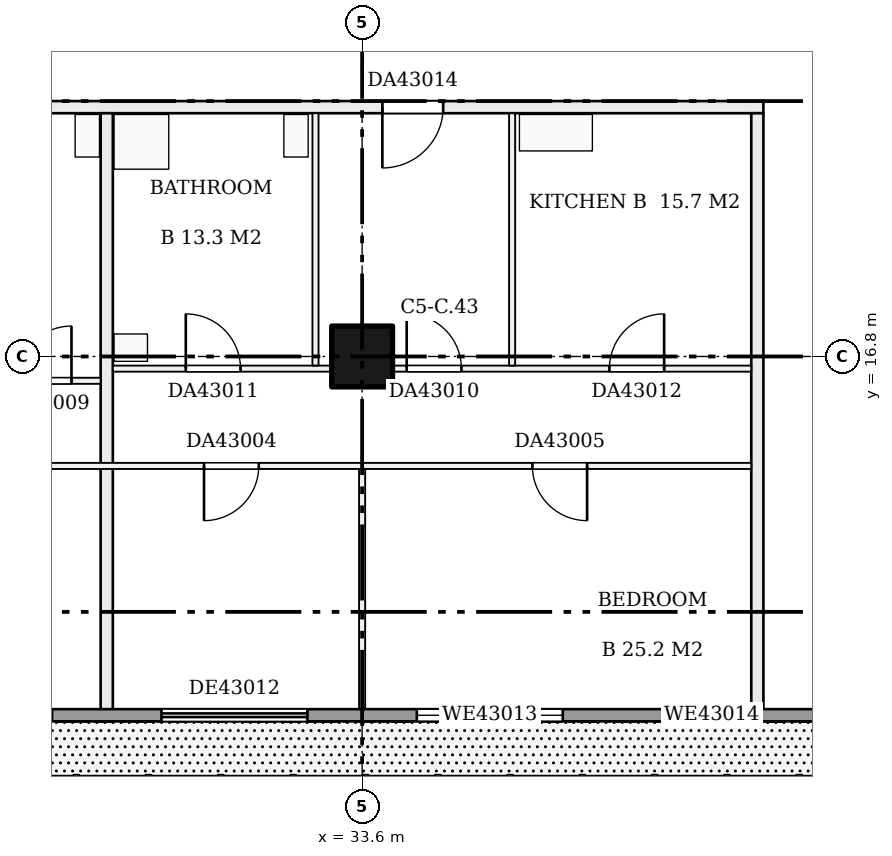
"""IFC4 building model, lengths in metres.
Left out: names, types, materials, properties, quantities, classifications, styles, units other than length and angle.
Written with IfcOpenShell. Run it as: python <this file> out.ifc"""

import sys

from ifc_helpers import new_model, si_unit, direction, frame, frame_2d, origin, origin_2d, place, context, subcontext, project, spatial, rectangle, extrude, element, fill, save


model = new_model("IFC4")
c1 = context("Model", 3, precision=1e-05, world=origin(), true_north=direction((0.0, 1.0)))
c2 = subcontext(c1, "Body", "Model", "MODEL_VIEW")
j1 = project(units=[si_unit("LENGTHUNIT", "METRE"), si_unit("PLANEANGLEUNIT", "RADIAN")], contexts=[c1])
p1 = place(None, origin())
s1 = spatial("IfcSite", under=j1, at=p1, CompositionType="ELEMENT")
p2 = place(p1, origin())
s2 = spatial("IfcBuilding", under=s1, at=p2, CompositionType="ELEMENT")
p3 = place(p2, frame((0.0, 0.0, 168.7)))
s3 = spatial("IfcBuildingStorey", under=s2, at=p3, CompositionType="ELEMENT", Elevation=168.7)
p4 = place(p3, frame((33.6, 16.8, 0.0), z_axis=(0.0, 0.0, 1.0), x_axis=(1.0, 0.0, 0.0)))
e1 = element("IfcColumn", 1, at=p4, inside=s3, PredefinedType="COLUMN", context=c2, shape_type="SweptSolid", body=[
    extrude(rectangle(XDim=1.0, YDim=1.0, at=origin_2d()), origin(), (0.0, 0.0, 1.0), 3.22),
])
p5 = place(p3, frame((21.1, 15.0, 0.0), z_axis=(0.0, 0.0, 1.0), x_axis=(1.0, 0.0, 0.0)))
e2 = element("IfcWall", 2, at=p5, inside=s3, PredefinedType="PARTITIONING", context=c2, shape_type="SweptSolid", body=[
    extrude(rectangle(XDim=18.9, YDim=0.1, at=frame_2d((9.45, 0.0))), origin(), (0.0, 0.0, 1.0), 3.22),
])
p6 = place(p5, frame((1.6, 0.0, 0.0)))
e3 = element("IfcOpeningElement", 3, at=p6, cuts=e2, PredefinedType="OPENING", context=c2, shape_type="SweptSolid", body=[
    extrude(rectangle(XDim=0.9, YDim=2.1, at=frame_2d((0.45, 1.05))), frame((0.0, 0.06, 0.0), z_axis=(0.0, -1.0, 0.0), x_axis=(1.0, 0.0, 0.0)), (0.0, 0.0, 1.0), 0.12),
])
p7 = place(p5, frame((5.7, 0.0, 0.0)))
e4 = element("IfcOpeningElement", 4, at=p7, cuts=e2, PredefinedType="OPENING", context=c2, shape_type="SweptSolid", body=[
    extrude(rectangle(XDim=0.9, YDim=2.1, at=frame_2d((0.45, 1.05))), frame((0.0, 0.06, 0.0), z_axis=(0.0, -1.0, 0.0), x_axis=(1.0, 0.0, 0.0)), (0.0, 0.0, 1.0), 0.12),
])
p8 = place(p5, frame((9.9, 0.0, 0.0)))
e5 = element("IfcOpeningElement", 5, at=p8, cuts=e2, PredefinedType="OPENING", context=c2, shape_type="SweptSolid", body=[
    extrude(rectangle(XDim=0.9, YDim=2.1, at=frame_2d((0.45, 1.05))), frame((0.0, 0.06, 0.0), z_axis=(0.0, -1.0, 0.0), x_axis=(1.0, 0.0, 0.0)), (0.0, 0.0, 1.0), 0.12),
])
p9 = place(p5, frame((15.3, 0.0, 0.0)))
e6 = element("IfcOpeningElement", 6, at=p9, cuts=e2, PredefinedType="OPENING", context=c2, shape_type="SweptSolid", body=[
    extrude(rectangle(XDim=0.9, YDim=2.1, at=frame_2d((0.45, 1.05))), frame((0.0, 0.06, 0.0), z_axis=(0.0, -1.0, 0.0), x_axis=(1.0, 0.0, 0.0)), (0.0, 0.0, 1.0), 0.12),
])
p10 = place(p3, frame((21.1, 16.4, 0.0), z_axis=(0.0, 0.0, 1.0), x_axis=(1.0, 0.0, 0.0)))
e7 = element("IfcWall", 7, at=p10, inside=s3, PredefinedType="PARTITIONING", context=c2, shape_type="SweptSolid", body=[
    extrude(rectangle(XDim=8.2, YDim=0.1, at=frame_2d((4.1, 0.0))), origin(), (0.0, 0.0, 1.0), 3.22),
])
p11 = place(p10, frame((4.9, 0.0, 0.0)))
e8 = element("IfcOpeningElement", 8, at=p11, cuts=e7, PredefinedType="OPENING", context=c2, shape_type="SweptSolid", body=[
    extrude(rectangle(XDim=0.9, YDim=2.1, at=frame_2d((0.45, 1.05))), frame((0.0, 0.06, 0.0), z_axis=(0.0, -1.0, 0.0), x_axis=(1.0, 0.0, 0.0)), (0.0, 0.0, 1.0), 0.12),
])
p12 = place(p10, frame((0.5, 0.0, 0.0)))
e9 = element("IfcOpeningElement", 9, at=p12, cuts=e7, PredefinedType="OPENING", context=c2, shape_type="SweptSolid", body=[
    extrude(rectangle(XDim=0.9, YDim=2.1, at=frame_2d((0.45, 1.05))), frame((0.0, 0.06, 0.0), z_axis=(0.0, -1.0, 0.0), x_axis=(1.0, 0.0, 0.0)), (0.0, 0.0, 1.0), 0.12),
])
p13 = place(p10, frame((2.48, 0.0, 0.0)))
e10 = element("IfcOpeningElement", 10, at=p13, cuts=e7, PredefinedType="OPENING", context=c2, shape_type="SweptSolid", body=[
    extrude(rectangle(XDim=0.9, YDim=2.1, at=frame_2d((0.45, 1.05))), frame((0.0, 0.06, 0.0), z_axis=(0.0, -1.0, 0.0), x_axis=(1.0, 0.0, 0.0)), (0.0, 0.0, 1.0), 0.12),
])
p14 = place(p10, frame((6.82, 0.0, 0.0)))
e11 = element("IfcOpeningElement", 11, at=p14, cuts=e7, PredefinedType="OPENING", context=c2, shape_type="SweptSolid", body=[
    extrude(rectangle(XDim=0.9, YDim=2.1, at=frame_2d((0.45, 1.05))), frame((0.0, 0.06, 0.0), z_axis=(0.0, -1.0, 0.0), x_axis=(1.0, 0.0, 0.0)), (0.0, 0.0, 1.0), 0.12),
])
p15 = place(p3, frame((29.5, 16.6, 0.0), z_axis=(0.0, 0.0, 1.0), x_axis=(1.0, 0.0, 0.0)))
e12 = element("IfcWall", 12, at=p15, inside=s3, PredefinedType="PARTITIONING", context=c2, shape_type="SweptSolid", body=[
    extrude(rectangle(XDim=10.5, YDim=0.1, at=frame_2d((5.25, 0.0))), origin(), (0.0, 0.0, 1.0), 3.22),
])
p16 = place(p15, frame((4.833, 0.0, 0.0)))
e13 = element("IfcOpeningElement", 13, at=p16, cuts=e12, PredefinedType="OPENING", context=c2, shape_type="SweptSolid", body=[
    extrude(rectangle(XDim=0.9, YDim=2.1, at=frame_2d((0.45, 1.05))), frame((0.0, 0.06, 0.0), z_axis=(0.0, -1.0, 0.0), x_axis=(1.0, 0.0, 0.0)), (0.0, 0.0, 1.0), 0.12),
])
p17 = place(p15, frame((1.2, 0.0, 0.0)))
e14 = element("IfcOpeningElement", 14, at=p17, cuts=e12, PredefinedType="OPENING", context=c2, shape_type="SweptSolid", body=[
    extrude(rectangle(XDim=0.9, YDim=2.1, at=frame_2d((0.45, 1.05))), frame((0.0, 0.06, 0.0), z_axis=(0.0, -1.0, 0.0), x_axis=(1.0, 0.0, 0.0)), (0.0, 0.0, 1.0), 0.12),
])
p18 = place(p15, frame((8.167, 0.0, 0.0)))
e15 = element("IfcOpeningElement", 15, at=p18, cuts=e12, PredefinedType="OPENING", context=c2, shape_type="SweptSolid", body=[
    extrude(rectangle(XDim=0.9, YDim=2.1, at=frame_2d((0.45, 1.05))), frame((0.0, 0.06, 0.0), z_axis=(0.0, -1.0, 0.0), x_axis=(1.0, 0.0, 0.0)), (0.0, 0.0, 1.0), 0.12),
])
p19 = place(p3, frame((20.9, 20.9, 0.0), z_axis=(0.0, 0.0, 1.0), x_axis=(1.0, 0.0, 0.0)))
e16 = element("IfcWall", 16, at=p19, inside=s3, PredefinedType="PARTITIONING", context=c2, shape_type="SweptSolid", body=[
    extrude(rectangle(XDim=19.3, YDim=0.2, at=frame_2d((9.65, 0.0))), origin(), (0.0, 0.0, 1.0), 3.22),
])
p20 = place(p19, frame((5.1, 0.0, 0.0)))
e17 = element("IfcOpeningElement", 17, at=p20, cuts=e16, PredefinedType="OPENING", context=c2, shape_type="SweptSolid", body=[
    extrude(rectangle(XDim=1.0, YDim=2.1, at=frame_2d((0.5, 1.05))), frame((0.0, 0.11, 0.0), z_axis=(0.0, -1.0, 0.0), x_axis=(1.0, 0.0, 0.0)), (0.0, 0.0, 1.0), 0.22),
])
p21 = place(p19, frame((13.033, 0.0, 0.0)))
e18 = element("IfcOpeningElement", 18, at=p21, cuts=e16, PredefinedType="OPENING", context=c2, shape_type="SweptSolid", body=[
    extrude(rectangle(XDim=1.0, YDim=2.1, at=frame_2d((0.5, 1.05))), frame((0.0, 0.11, 0.0), z_axis=(0.0, -1.0, 0.0), x_axis=(1.0, 0.0, 0.0)), (0.0, 0.0, 1.0), 0.22),
])
p22 = place(p3, frame((29.4, 10.9, 0.0), z_axis=(0.0, 0.0, 1.0), x_axis=(0.0, 1.0, 0.0)))
e19 = element("IfcWall", 19, at=p22, inside=s3, PredefinedType="PARTITIONING", context=c2, shape_type="SweptSolid", body=[
    extrude(rectangle(XDim=9.9, YDim=0.2, at=frame_2d((4.95, 0.0))), origin(), (0.0, 0.0, 1.0), 3.22),
])
p23 = place(p3, frame((32.833, 16.65, 0.0), z_axis=(0.0, 0.0, 1.0), x_axis=(0.0, 1.0, 0.0)))
e20 = element("IfcWall", 20, at=p23, inside=s3, PredefinedType="PARTITIONING", context=c2, shape_type="SweptSolid", body=[
    extrude(rectangle(XDim=4.15, YDim=0.1, at=frame_2d((2.075, 0.0))), origin(), (0.0, 0.0, 1.0), 3.22),
])
p24 = place(p3, frame((33.6, 10.9, 0.0), z_axis=(0.0, 0.0, 1.0), x_axis=(0.0, 1.0, 0.0)))
e21 = element("IfcWall", 21, at=p24, inside=s3, PredefinedType="PARTITIONING", context=c2, shape_type="SweptSolid", body=[
    extrude(rectangle(XDim=4.05, YDim=0.1, at=frame_2d((2.025, 0.0))), origin(), (0.0, 0.0, 1.0), 3.22),
])
p25 = place(p3, frame((36.067, 16.65, 0.0), z_axis=(0.0, 0.0, 1.0), x_axis=(0.0, 1.0, 0.0)))
e22 = element("IfcWall", 22, at=p25, inside=s3, PredefinedType="PARTITIONING", context=c2, shape_type="SweptSolid", body=[
    extrude(rectangle(XDim=4.15, YDim=0.1, at=frame_2d((2.075, 0.0))), origin(), (0.0, 0.0, 1.0), 3.22),
])
p26 = place(p3, frame((40.1, 10.9, 0.0), z_axis=(0.0, 0.0, 1.0), x_axis=(0.0, 1.0, 0.0)))
e23 = element("IfcWall", 23, at=p26, inside=s3, PredefinedType="PARTITIONING", context=c2, shape_type="SweptSolid", body=[
    extrude(rectangle(XDim=9.9, YDim=0.2, at=frame_2d((4.95, 0.0))), origin(), (0.0, 0.0, 1.0), 3.22),
])
p27 = place(p3, frame((13.2, 10.9, 0.0), z_axis=(0.0, 0.0, 1.0), x_axis=(1.0, 0.0, 0.0)))
e24 = element("IfcWall", 24, at=p27, inside=s3, PredefinedType="SOLIDWALL", context=c2, shape_type="SweptSolid", body=[
    extrude(rectangle(XDim=28.8, YDim=0.2, at=frame_2d((14.4, 0.0))), origin(), (0.0, 0.0, 1.0), 3.22),
])
p28 = place(p27, frame((0.3, 0.0, 0.0)))
e25 = element("IfcOpeningElement", 25, at=p28, cuts=e24, PredefinedType="OPENING", context=c2, shape_type="SweptSolid", body=[
    extrude(rectangle(XDim=2.4, YDim=2.2, at=frame_2d((1.2, 1.1))), frame((0.0, 0.11, 0.0), z_axis=(0.0, -1.0, 0.0), x_axis=(1.0, 0.0, 0.0)), (0.0, 0.0, 1.0), 0.22),
])
p29 = place(p27, frame((4.5, 0.0, 0.0)))
e26 = element("IfcOpeningElement", 26, at=p29, cuts=e24, PredefinedType="OPENING", context=c2, shape_type="SweptSolid", body=[
    extrude(rectangle(XDim=2.4, YDim=2.2, at=frame_2d((1.2, 1.1))), frame((0.0, 0.11, 0.0), z_axis=(0.0, -1.0, 0.0), x_axis=(1.0, 0.0, 0.0)), (0.0, 0.0, 1.0), 0.22),
])
p30 = place(p27, frame((8.7, 0.0, 0.9)))
e27 = element("IfcOpeningElement", 27, at=p30, cuts=e24, PredefinedType="OPENING", context=c2, shape_type="SweptSolid", body=[
    extrude(rectangle(XDim=2.4, YDim=1.5, at=frame_2d((1.2, 0.75))), frame((0.0, 0.11, 0.0), z_axis=(0.0, -1.0, 0.0), x_axis=(1.0, 0.0, 0.0)), (0.0, 0.0, 1.0), 0.22),
])
p31 = place(p27, frame((12.9, 0.0, 0.9)))
e28 = element("IfcOpeningElement", 28, at=p31, cuts=e24, PredefinedType="OPENING", context=c2, shape_type="SweptSolid", body=[
    extrude(rectangle(XDim=2.4, YDim=1.5, at=frame_2d((1.2, 0.75))), frame((0.0, 0.11, 0.0), z_axis=(0.0, -1.0, 0.0), x_axis=(1.0, 0.0, 0.0)), (0.0, 0.0, 1.0), 0.22),
])
p32 = place(p27, frame((17.1, 0.0, 0.0)))
e29 = element("IfcOpeningElement", 29, at=p32, cuts=e24, PredefinedType="OPENING", context=c2, shape_type="SweptSolid", body=[
    extrude(rectangle(XDim=2.4, YDim=2.2, at=frame_2d((1.2, 1.1))), frame((0.0, 0.11, 0.0), z_axis=(0.0, -1.0, 0.0), x_axis=(1.0, 0.0, 0.0)), (0.0, 0.0, 1.0), 0.22),
])
p33 = place(p27, frame((21.3, 0.0, 0.9)))
e30 = element("IfcOpeningElement", 30, at=p33, cuts=e24, PredefinedType="OPENING", context=c2, shape_type="SweptSolid", body=[
    extrude(rectangle(XDim=2.4, YDim=1.5, at=frame_2d((1.2, 0.75))), frame((0.0, 0.11, 0.0), z_axis=(0.0, -1.0, 0.0), x_axis=(1.0, 0.0, 0.0)), (0.0, 0.0, 1.0), 0.22),
])
p34 = place(p27, frame((25.5, 0.0, 0.9)))
e31 = element("IfcOpeningElement", 31, at=p34, cuts=e24, PredefinedType="OPENING", context=c2, shape_type="SweptSolid", body=[
    extrude(rectangle(XDim=1.3, YDim=1.5, at=frame_2d((0.65, 0.75))), frame((0.0, 0.11, 0.0), z_axis=(0.0, -1.0, 0.0), x_axis=(1.0, 0.0, 0.0)), (0.0, 0.0, 1.0), 0.22),
])
p35 = place(p8, frame((0.9, 0.0, 0.0), z_axis=(0.0, 0.0, 1.0), x_axis=(-1.0, 0.0, 0.0)))
e32 = element("IfcDoor", 32, at=p35, inside=s3, OperationType="SINGLE_SWING_RIGHT", PredefinedType="DOOR", context=c2, shape_type="SweptSolid", body=[
    extrude(rectangle(XDim=0.9, YDim=2.1, at=frame_2d((0.45, 1.05))), frame((0.0, 0.025, 0.0), z_axis=(0.0, -1.0, 0.0), x_axis=(1.0, 0.0, 0.0)), (0.0, 0.0, 1.0), 0.05),
])
fill(e5, e32)
p36 = place(p9, frame((0.9, 0.0, 0.0), z_axis=(0.0, 0.0, 1.0), x_axis=(-1.0, 0.0, 0.0)))
e33 = element("IfcDoor", 33, at=p36, inside=s3, OperationType="SINGLE_SWING_LEFT", PredefinedType="DOOR", context=c2, shape_type="SweptSolid", body=[
    extrude(rectangle(XDim=0.9, YDim=2.1, at=frame_2d((0.45, 1.05))), frame((0.0, 0.025, 0.0), z_axis=(0.0, -1.0, 0.0), x_axis=(1.0, 0.0, 0.0)), (0.0, 0.0, 1.0), 0.05),
])
fill(e6, e33)
p37 = place(p14, origin())
e34 = element("IfcDoor", 34, at=p37, inside=s3, OperationType="SINGLE_SWING_RIGHT", PredefinedType="DOOR", context=c2, shape_type="SweptSolid", body=[
    extrude(rectangle(XDim=0.9, YDim=2.1, at=frame_2d((0.45, 1.05))), frame((0.0, 0.025, 0.0), z_axis=(0.0, -1.0, 0.0), x_axis=(1.0, 0.0, 0.0)), (0.0, 0.0, 1.0), 0.05),
])
fill(e11, e34)
p38 = place(p16, origin())
e35 = element("IfcDoor", 35, at=p38, inside=s3, OperationType="SINGLE_SWING_LEFT", PredefinedType="DOOR", context=c2, shape_type="SweptSolid", body=[
    extrude(rectangle(XDim=0.9, YDim=2.1, at=frame_2d((0.45, 1.05))), frame((0.0, 0.025, 0.0), z_axis=(0.0, -1.0, 0.0), x_axis=(1.0, 0.0, 0.0)), (0.0, 0.0, 1.0), 0.05),
])
fill(e13, e35)
p39 = place(p17, origin())
e36 = element("IfcDoor", 36, at=p39, inside=s3, OperationType="SINGLE_SWING_LEFT", PredefinedType="DOOR", context=c2, shape_type="SweptSolid", body=[
    extrude(rectangle(XDim=0.9, YDim=2.1, at=frame_2d((0.45, 1.05))), frame((0.0, 0.025, 0.0), z_axis=(0.0, -1.0, 0.0), x_axis=(1.0, 0.0, 0.0)), (0.0, 0.0, 1.0), 0.05),
])
fill(e14, e36)
p40 = place(p18, origin())
e37 = element("IfcDoor", 37, at=p40, inside=s3, OperationType="SINGLE_SWING_RIGHT", PredefinedType="DOOR", context=c2, shape_type="SweptSolid", body=[
    extrude(rectangle(XDim=0.9, YDim=2.1, at=frame_2d((0.45, 1.05))), frame((0.0, 0.025, 0.0), z_axis=(0.0, -1.0, 0.0), x_axis=(1.0, 0.0, 0.0)), (0.0, 0.0, 1.0), 0.05),
])
fill(e15, e37)
p41 = place(p21, frame((1.0, 0.0, 0.0), z_axis=(0.0, 0.0, 1.0), x_axis=(-1.0, 0.0, 0.0)))
e38 = element("IfcDoor", 38, at=p41, inside=s3, OperationType="SINGLE_SWING_RIGHT", PredefinedType="DOOR", context=c2, shape_type="SweptSolid", body=[
    extrude(rectangle(XDim=1.0, YDim=2.1, at=frame_2d((0.5, 1.05))), frame((0.0, 0.025, 0.0), z_axis=(0.0, -1.0, 0.0), x_axis=(1.0, 0.0, 0.0)), (0.0, 0.0, 1.0), 0.05),
])
fill(e18, e38)
p42 = place(p32, origin())
e39 = element("IfcDoor", 39, at=p42, inside=s3, OperationType="DOUBLE_DOOR_SLIDING", PredefinedType="DOOR", context=c2, shape_type="SweptSolid", body=[
    extrude(rectangle(XDim=2.4, YDim=2.2, at=frame_2d((1.2, 1.1))), frame((0.0, 0.025, 0.0), z_axis=(0.0, -1.0, 0.0), x_axis=(1.0, 0.0, 0.0)), (0.0, 0.0, 1.0), 0.05),
])
fill(e29, e39)
p43 = place(p33, origin())
e40 = element("IfcWindow", 40, at=p43, inside=s3, PartitioningType="SINGLE_PANEL", PredefinedType="WINDOW", context=c2, shape_type="SweptSolid", body=[
    extrude(rectangle(XDim=2.4, YDim=1.5, at=frame_2d((1.2, 0.75))), frame((0.0, 0.03, 0.0), z_axis=(0.0, -1.0, 0.0), x_axis=(1.0, 0.0, 0.0)), (0.0, 0.0, 1.0), 0.06),
])
fill(e30, e40)
p44 = place(p34, origin())
e41 = element("IfcWindow", 41, at=p44, inside=s3, PartitioningType="SINGLE_PANEL", PredefinedType="WINDOW", context=c2, shape_type="SweptSolid", body=[
    extrude(rectangle(XDim=1.3, YDim=1.5, at=frame_2d((0.65, 0.75))), frame((0.0, 0.03, 0.0), z_axis=(0.0, -1.0, 0.0), x_axis=(1.0, 0.0, 0.0)), (0.0, 0.0, 1.0), 0.06),
])
fill(e31, e41)
save(model, sys.argv[1])
